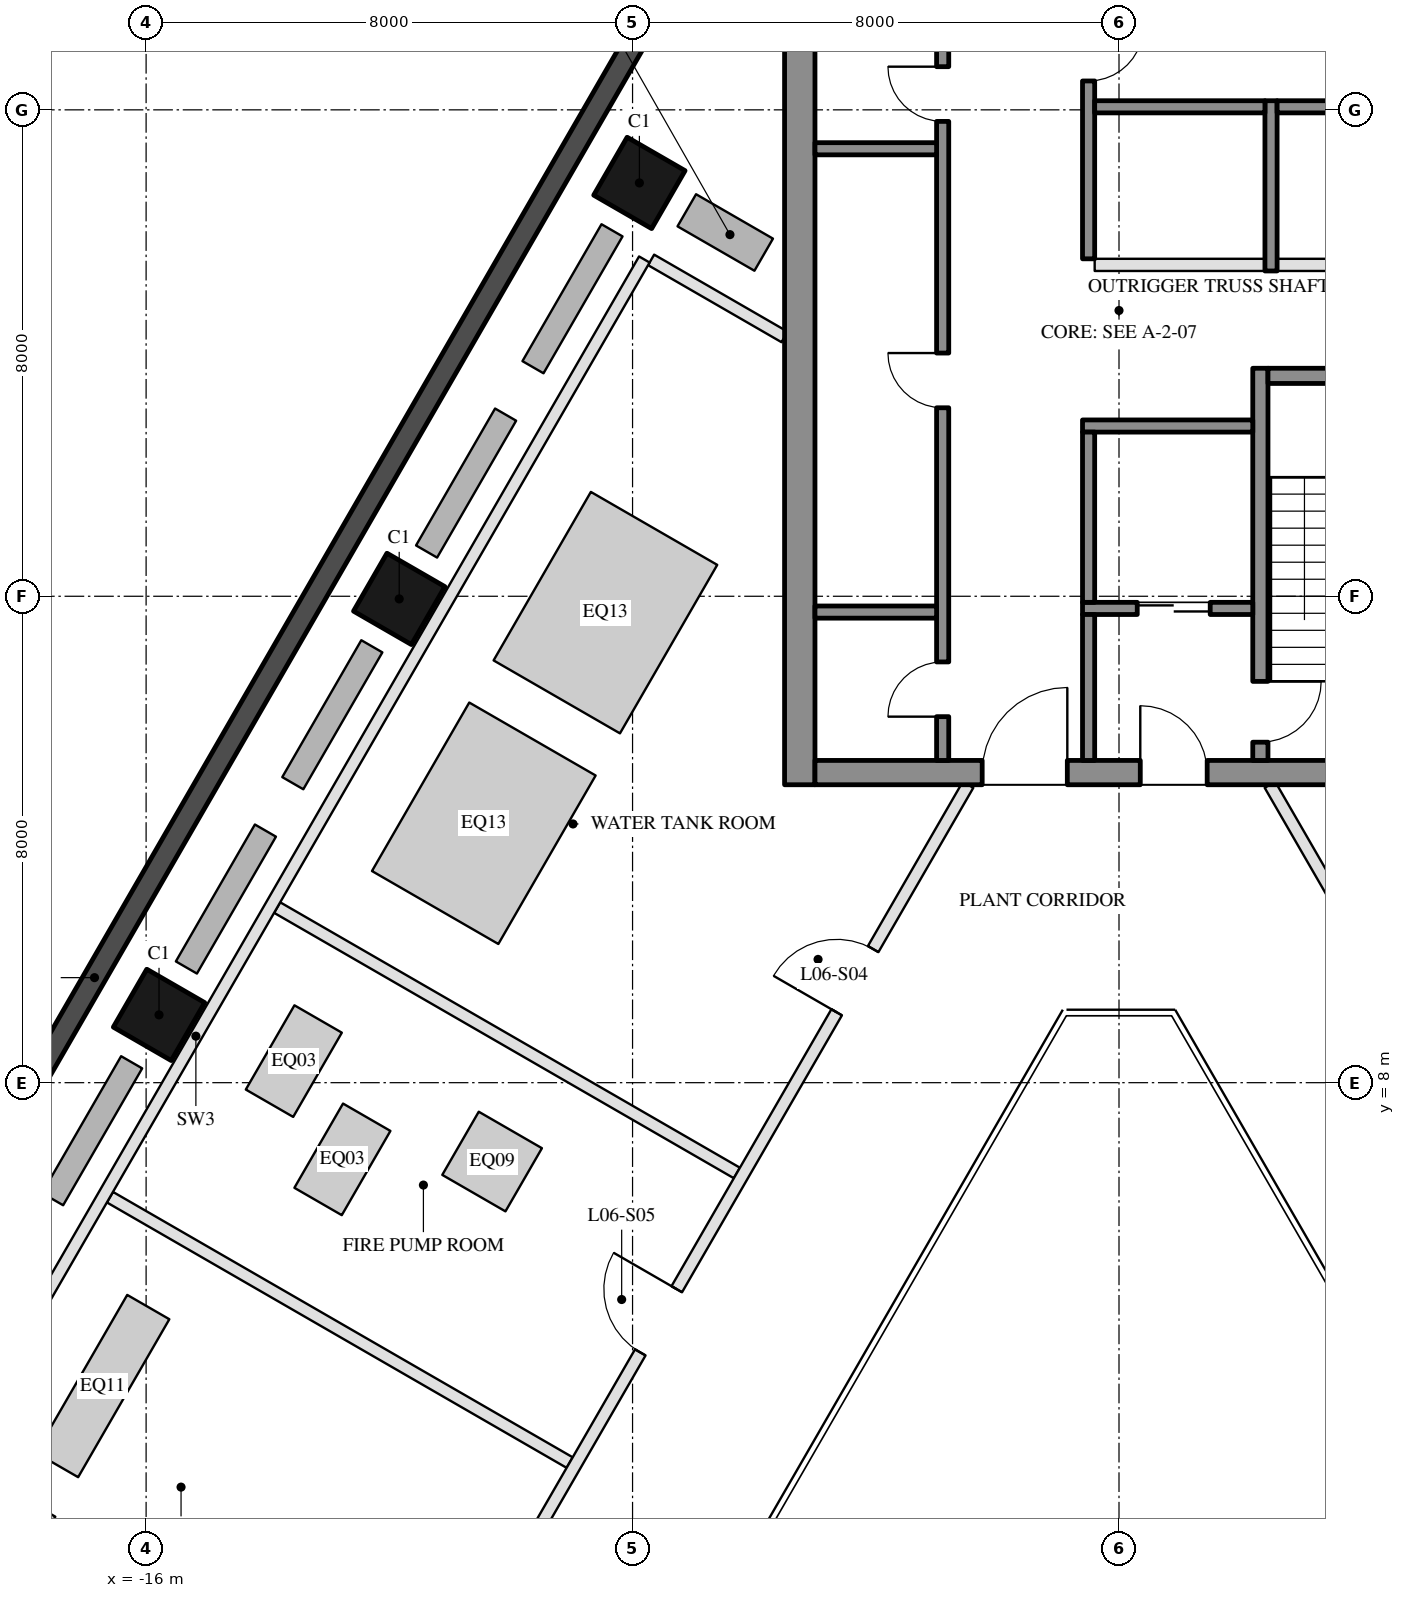
"""IFC4 building model, lengths in metres.
Left out: names, types, materials, properties, quantities, classifications, styles, units other than length and angle.
Written with IfcOpenShell. Run it as: python <this file> out.ifc"""

import sys

from ifc_helpers import new_model, si_unit, direction, frame, frame_2d, origin, origin_2d, place, context, subcontext, project, spatial, rectangle, hollow_rectangle, extrude, boolean, halfspace, element, fill, save


model = new_model("IFC4")
c1 = context("Model", 3, precision=1e-05, world=origin(), true_north=direction((0.0, 1.0)))
c2 = subcontext(c1, "Body", "Model", "MODEL_VIEW")
j1 = project(units=[si_unit("LENGTHUNIT", "METRE"), si_unit("PLANEANGLEUNIT", "RADIAN")], contexts=[c1])
p1 = place(None, origin())
s1 = spatial("IfcSite", under=j1, at=p1, CompositionType="ELEMENT")
p2 = place(p1, origin())
s2 = spatial("IfcBuilding", under=s1, at=p2, CompositionType="ELEMENT")
p3 = place(p2, frame((0.0, 0.0, 37.5)))
s3 = spatial("IfcBuildingStorey", under=s2, at=p3, CompositionType="ELEMENT", Elevation=37.5)
p4 = place(p3, frame((-7.888, 22.798, 0.0), z_axis=(0.0, 0.0, 1.0), x_axis=(0.5, 0.866025403784, 0.0)))
e1 = element("IfcColumn", 1, at=p4, inside=s3, PredefinedType="COLUMN", context=c2, shape_type="SweptSolid", body=[
    boolean("DIFFERENCE", extrude(hollow_rectangle(XDim=1.1, YDim=1.1, WallThickness=0.05, at=origin_2d()), origin(), (0.0, 0.0, 1.0), 4.5), halfspace(frame((0.0, 0.0, 0.007), z_axis=(0.0, 0.0, 1.0), x_axis=(1.0, 0.0, 0.0)), True)),
])
p5 = place(p3, frame((-11.838, 15.957, 0.0), z_axis=(0.0, 0.0, 1.0), x_axis=(0.5, 0.866025403784, 0.0)))
e2 = element("IfcColumn", 2, at=p5, inside=s3, PredefinedType="COLUMN", context=c2, shape_type="SweptSolid", body=[
    boolean("DIFFERENCE", extrude(hollow_rectangle(XDim=1.1, YDim=1.1, WallThickness=0.05, at=origin_2d()), origin(), (0.0, 0.0, 1.0), 4.5), halfspace(frame((0.0, 0.0, 0.006), z_axis=(0.0, 0.0, 1.0), x_axis=(1.0, 0.0, 0.0)), True)),
])
p6 = place(p3, frame((-15.788, 9.115, 0.0), z_axis=(0.0, 0.0, 1.0), x_axis=(0.5, 0.866025403784, 0.0)))
e3 = element("IfcColumn", 3, at=p6, inside=s3, PredefinedType="COLUMN", context=c2, shape_type="SweptSolid", body=[
    boolean("DIFFERENCE", extrude(hollow_rectangle(XDim=1.1, YDim=1.1, WallThickness=0.05, at=origin_2d()), origin(), (0.0, 0.0, 1.0), 4.5), halfspace(frame((0.0, 0.0, 0.006), z_axis=(0.0, 0.0, 1.0), x_axis=(1.0, 0.0, 0.0)), True)),
])
p7 = place(p3, frame((-7.441, 26.022, 0.0), z_axis=(0.0, 0.0, 1.0), x_axis=(-0.499998380999, -0.866026338513, 0.0)))
e4 = element("IfcWall", 4, at=p7, inside=s3, PredefinedType="SOLIDWALL", context=c2, shape_type="SweptSolid", body=[
    extrude(rectangle(XDim=37.631, YDim=0.35, at=frame_2d((18.816, 0.0))), origin(), (0.0, 0.0, 1.0), 4.2),
])
p8 = place(p3, frame((-5.25, 12.9, 0.0), z_axis=(0.0, 0.0, 1.0), x_axis=(0.0, 1.0, 0.0)))
e5 = element("IfcWall", 5, at=p8, inside=s3, PredefinedType="SHEAR", context=c2, shape_type="SweptSolid", body=[
    extrude(rectangle(XDim=14.837, YDim=0.5, at=frame_2d((7.418, 0.0))), origin(), (0.0, 0.0, 1.0), 4.2),
])
p9 = place(p3, frame((5.0, 13.1, 0.0), z_axis=(0.0, 0.0, 1.0), x_axis=(-1.0, 0.0, 0.0)))
e6 = element("IfcWall", 6, at=p9, inside=s3, PredefinedType="SHEAR", context=c2, shape_type="SweptSolid", body=[
    extrude(rectangle(XDim=10.0, YDim=0.4, at=frame_2d((5.0, 0.0))), origin(), (0.0, 0.0, 1.0), 4.2),
])
p10 = place(p9, frame((3.55, 0.0, 0.0)))
e7 = element("IfcOpeningElement", 7, at=p10, cuts=e6, PredefinedType="OPENING", context=c2, shape_type="SweptSolid", body=[
    extrude(rectangle(XDim=1.1, YDim=2.1, at=frame_2d((0.55, 1.05))), frame((0.0, 0.21, 0.0), z_axis=(0.0, -1.0, 0.0), x_axis=(1.0, 0.0, 0.0)), (0.0, 0.0, 1.0), 0.42),
])
p11 = place(p9, frame((5.85, 0.0, 0.0)))
e8 = element("IfcOpeningElement", 8, at=p11, cuts=e6, PredefinedType="OPENING", context=c2, shape_type="SweptSolid", body=[
    extrude(rectangle(XDim=1.4, YDim=2.1, at=frame_2d((0.7, 1.05))), frame((0.0, 0.21, 0.0), z_axis=(0.0, -1.0, 0.0), x_axis=(1.0, 0.0, 0.0)), (0.0, 0.0, 1.0), 0.42),
])
p12 = place(p3, frame((2.325, 13.3, 0.0), z_axis=(0.0, 0.0, 1.0), x_axis=(0.0, 1.0, 0.0)))
e9 = element("IfcWall", 9, at=p12, inside=s3, PredefinedType="SHEAR", context=c2, shape_type="SweptSolid", body=[
    extrude(rectangle(XDim=6.45, YDim=0.25, at=frame_2d((3.225, 0.0))), origin(), (0.0, 0.0, 1.0), 4.2),
])
p13 = place(p12, frame((0.3, 0.0, 0.0)))
e10 = element("IfcOpeningElement", 10, at=p13, cuts=e9, PredefinedType="OPENING", context=c2, shape_type="SweptSolid", body=[
    extrude(rectangle(XDim=1.0, YDim=2.1, at=frame_2d((0.5, 1.05))), frame((0.0, 0.135, 0.0), z_axis=(0.0, -1.0, 0.0), x_axis=(1.0, 0.0, 0.0)), (0.0, 0.0, 1.0), 0.27),
])
p14 = place(p3, frame((5.0, 19.625, 0.0), z_axis=(0.0, 0.0, 1.0), x_axis=(-1.0, 0.0, 0.0)))
e11 = element("IfcWall", 11, at=p14, inside=s3, PredefinedType="SHEAR", context=c2, shape_type="SweptSolid", body=[
    extrude(rectangle(XDim=2.55, YDim=0.25, at=frame_2d((1.275, 0.0))), origin(), (0.0, 0.0, 1.0), 4.2),
])
p15 = place(p3, frame((2.2, 18.8, 0.0), z_axis=(0.0, 0.0, 1.0), x_axis=(-1.0, 0.0, 0.0)))
e12 = element("IfcWall", 12, at=p15, inside=s3, PredefinedType="SHEAR", context=c2, shape_type="SweptSolid", body=[
    extrude(rectangle(XDim=2.8, YDim=0.2, at=frame_2d((1.4, 0.0))), origin(), (0.0, 0.0, 1.0), 4.2),
])
p16 = place(p3, frame((2.2, 15.8, 0.0), z_axis=(0.0, 0.0, 1.0), x_axis=(-1.0, 0.0, 0.0)))
e13 = element("IfcWall", 13, at=p16, inside=s3, PredefinedType="SHEAR", context=c2, shape_type="SweptSolid", body=[
    extrude(rectangle(XDim=2.8, YDim=0.2, at=frame_2d((1.4, 0.0))), origin(), (0.0, 0.0, 1.0), 4.2),
])
p17 = place(p16, frame((0.7, 0.0, 0.0)))
e14 = element("IfcOpeningElement", 14, at=p17, cuts=e13, PredefinedType="OPENING", context=c2, shape_type="SweptSolid", body=[
    extrude(rectangle(XDim=1.2, YDim=2.1, at=frame_2d((0.6, 1.05))), frame((0.0, 0.11, 0.0), z_axis=(0.0, -1.0, 0.0), x_axis=(1.0, 0.0, 0.0)), (0.0, 0.0, 1.0), 0.22),
])
p18 = place(p3, frame((-0.5, 15.9, 0.0), z_axis=(0.0, 0.0, 1.0), x_axis=(0.0, 1.0, 0.0)))
e15 = element("IfcWall", 15, at=p18, inside=s3, PredefinedType="SHEAR", context=c2, shape_type="SweptSolid", body=[
    extrude(rectangle(XDim=2.8, YDim=0.2, at=frame_2d((1.4, 0.0))), origin(), (0.0, 0.0, 1.0), 4.2),
])
p19 = place(p3, frame((-0.5, 13.3, 0.0), z_axis=(0.0, 0.0, 1.0), x_axis=(0.0, 1.0, 0.0)))
e16 = element("IfcWall", 16, at=p19, inside=s3, PredefinedType="SHEAR", context=c2, shape_type="SweptSolid", body=[
    extrude(rectangle(XDim=2.4, YDim=0.2, at=frame_2d((1.2, 0.0))), origin(), (0.0, 0.0, 1.0), 4.2),
])
p20 = place(p3, frame((-2.9, 13.3, 0.0), z_axis=(0.0, 0.0, 1.0), x_axis=(0.0, 1.0, 0.0)))
e17 = element("IfcWall", 17, at=p20, inside=s3, PredefinedType="SHEAR", context=c2, shape_type="SweptSolid", body=[
    extrude(rectangle(XDim=12.6, YDim=0.2, at=frame_2d((6.3, 0.0))), origin(), (0.0, 0.0, 1.0), 4.2),
])
p21 = place(p20, frame((0.72, 0.0, 0.0)))
e18 = element("IfcOpeningElement", 18, at=p21, cuts=e17, PredefinedType="OPENING", context=c2, shape_type="SweptSolid", body=[
    extrude(rectangle(XDim=0.9, YDim=2.1, at=frame_2d((0.45, 1.05))), frame((0.0, 0.11, 0.0), z_axis=(0.0, -1.0, 0.0), x_axis=(1.0, 0.0, 0.0)), (0.0, 0.0, 1.0), 0.22),
])
p22 = place(p20, frame((5.8, 0.0, 0.0)))
e19 = element("IfcOpeningElement", 19, at=p22, cuts=e17, PredefinedType="OPENING", context=c2, shape_type="SweptSolid", body=[
    extrude(rectangle(XDim=0.9, YDim=2.1, at=frame_2d((0.45, 1.05))), frame((0.0, 0.11, 0.0), z_axis=(0.0, -1.0, 0.0), x_axis=(1.0, 0.0, 0.0)), (0.0, 0.0, 1.0), 0.22),
])
p23 = place(p20, frame((10.51, 0.0, 0.0)))
e20 = element("IfcOpeningElement", 20, at=p23, cuts=e17, PredefinedType="OPENING", context=c2, shape_type="SweptSolid", body=[
    extrude(rectangle(XDim=0.9, YDim=2.1, at=frame_2d((0.45, 1.05))), frame((0.0, 0.11, 0.0), z_axis=(0.0, -1.0, 0.0), x_axis=(1.0, 0.0, 0.0)), (0.0, 0.0, 1.0), 0.22),
])
p24 = place(p3, frame((-0.5, 21.55, 0.0), z_axis=(0.0, 0.0, 1.0), x_axis=(0.0, 1.0, 0.0)))
e21 = element("IfcWall", 21, at=p24, inside=s3, PredefinedType="SHEAR", context=c2, shape_type="SweptSolid", body=[
    extrude(rectangle(XDim=4.15, YDim=0.2, at=frame_2d((2.075, 0.0))), origin(), (0.0, 0.0, 1.0), 4.2),
])
p25 = place(p24, frame((2.925, 0.0, 0.0)))
e22 = element("IfcOpeningElement", 22, at=p25, cuts=e21, PredefinedType="OPENING", context=c2, shape_type="SweptSolid", body=[
    extrude(rectangle(XDim=0.9, YDim=2.1, at=frame_2d((0.45, 1.05))), frame((0.0, 0.11, 0.0), z_axis=(0.0, -1.0, 0.0), x_axis=(1.0, 0.0, 0.0)), (0.0, 0.0, 1.0), 0.22),
])
for number, where, z_axis, x_axis in (
    (23, (-3.0, 15.74, 0.0), (0.0, 0.0, 1.0), (-1.0, 0.0, 0.0)),
    (24, (-3.0, 23.36, 0.0), (0.0, 0.0, 1.0), (-1.0, 0.0, 0.0)),
):
    element("IfcWall", number, at=place(p3, frame(where, z_axis=z_axis, x_axis=x_axis)), inside=s3, PredefinedType="SHEAR", context=c2, shape_type="SweptSolid", body=[
        extrude(rectangle(XDim=2.0, YDim=0.2, at=frame_2d((1.0, 0.0))), origin(), (0.0, 0.0, 1.0), 4.2),
    ])
p26 = place(p3, frame((2.5, 21.35, 0.0), z_axis=(0.0, 0.0, 1.0), x_axis=(0.0, 1.0, 0.0)))
e25 = element("IfcWall", 25, at=p26, inside=s3, PredefinedType="SHEAR", context=c2, shape_type="SweptSolid", body=[
    extrude(rectangle(XDim=2.8, YDim=0.2, at=frame_2d((1.4, 0.0))), origin(), (0.0, 0.0, 1.0), 4.2),
])
p27 = place(p3, frame((5.0, 24.05, 0.0), z_axis=(0.0, 0.0, 1.0), x_axis=(-1.0, 0.0, 0.0)))
e26 = element("IfcWall", 26, at=p27, inside=s3, PredefinedType="SHEAR", context=c2, shape_type="SweptSolid", body=[
    extrude(rectangle(XDim=2.4, YDim=0.2, at=frame_2d((1.2, 0.0))), origin(), (0.0, 0.0, 1.0), 4.2),
])
p28 = place(p3, frame((2.4, 24.05, 0.0), z_axis=(0.0, 0.0, 1.0), x_axis=(-1.0, 0.0, 0.0)))
e27 = element("IfcWall", 27, at=p28, inside=s3, PredefinedType="SHEAR", context=c2, shape_type="SweptSolid", body=[
    extrude(rectangle(XDim=2.8, YDim=0.2, at=frame_2d((1.4, 0.0))), origin(), (0.0, 0.0, 1.0), 4.2),
])
p29 = place(p3, frame((5.0, 21.45, 0.0), z_axis=(0.0, 0.0, 1.0), x_axis=(-1.0, 0.0, 0.0)))
e28 = element("IfcWall", 28, at=p29, inside=s3, PredefinedType="PARTITIONING", context=c2, shape_type="SweptSolid", body=[
    extrude(rectangle(XDim=2.4, YDim=0.2, at=frame_2d((1.2, 0.0))), origin(), (0.0, 0.0, 1.0), 4.2),
])
p30 = place(p3, frame((2.4, 21.45, 0.0), z_axis=(0.0, 0.0, 1.0), x_axis=(-1.0, 0.0, 0.0)))
e29 = element("IfcWall", 29, at=p30, inside=s3, PredefinedType="PARTITIONING", context=c2, shape_type="SweptSolid", body=[
    extrude(rectangle(XDim=2.8, YDim=0.2, at=frame_2d((1.4, 0.0))), origin(), (0.0, 0.0, 1.0), 4.2),
])
p31 = place(p3, frame((12.413, -4.3, 0.0), z_axis=(0.0, 0.0, 1.0), x_axis=(-0.50000478328, 0.866022642139, 0.0)))
e30 = element("IfcWall", 30, at=p31, inside=s3, PredefinedType="PARTITIONING", context=c2, shape_type="SweptSolid", body=[
    extrude(rectangle(XDim=19.861, YDim=0.2, at=frame_2d((9.931, 0.0))), origin(), (0.0, 0.0, 1.0), 3.41),
])
p32 = place(p31, frame((2.371, 0.0, 0.0)))
e31 = element("IfcOpeningElement", 31, at=p32, cuts=e30, PredefinedType="OPENING", context=c2, shape_type="SweptSolid", body=[
    extrude(rectangle(XDim=1.2, YDim=2.1, at=frame_2d((0.6, 1.05))), frame((0.0, 0.11, 0.0), z_axis=(0.0, -1.0, 0.0), x_axis=(1.0, 0.0, 0.0)), (0.0, 0.0, 1.0), 0.22),
])
p33 = place(p31, frame((8.331, 0.0, 0.0)))
e32 = element("IfcOpeningElement", 32, at=p33, cuts=e30, PredefinedType="OPENING", context=c2, shape_type="SweptSolid", body=[
    extrude(rectangle(XDim=1.2, YDim=2.1, at=frame_2d((0.6, 1.05))), frame((0.0, 0.11, 0.0), z_axis=(0.0, -1.0, 0.0), x_axis=(1.0, 0.0, 0.0)), (0.0, 0.0, 1.0), 0.22),
])
p34 = place(p31, frame((15.29, 0.0, 0.0)))
e33 = element("IfcOpeningElement", 33, at=p34, cuts=e30, PredefinedType="OPENING", context=c2, shape_type="SweptSolid", body=[
    extrude(rectangle(XDim=1.2, YDim=2.1, at=frame_2d((0.6, 1.05))), frame((0.0, 0.11, 0.0), z_axis=(0.0, -1.0, 0.0), x_axis=(1.0, 0.0, 0.0)), (0.0, 0.0, 1.0), 0.22),
])
p35 = place(p3, frame((-7.695, 21.532, 0.0), z_axis=(0.0, 0.0, 1.0), x_axis=(0.865999496279, -0.500044870432, 0.0)))
e34 = element("IfcWall", 34, at=p35, inside=s3, PredefinedType="PARTITIONING", context=c2, shape_type="SweptSolid", body=[
    extrude(rectangle(XDim=2.534, YDim=0.2, at=frame_2d((1.267, 0.0))), origin(), (0.0, 0.0, 1.0), 4.2),
])
for number, where, z_axis, x_axis in (
    (35, (-13.845, 10.88, 0.0), (0.0, 0.0, 1.0), (0.866, -0.5, 0.0)),
    (36, (-16.595, 6.117, 0.0), (0.0, 0.0, 1.0), (0.866, -0.5, 0.0)),
):
    element("IfcWall", number, at=place(p3, frame(where, z_axis=z_axis, x_axis=x_axis)), inside=s3, PredefinedType="PARTITIONING", context=c2, shape_type="SweptSolid", body=[
        extrude(rectangle(XDim=8.73, YDim=0.2, at=frame_2d((4.365, 0.0))), origin(), (0.0, 0.0, 1.0), 4.2),
    ])
p36 = place(p3, frame((-7.806, 21.539, 0.0), z_axis=(0.0, 0.0, 1.0), x_axis=(-0.500002084189, -0.866024200474, 0.0)))
e37 = element("IfcWall", 37, at=p36, inside=s3, PredefinedType="PARTITIONING", context=c2, shape_type="SweptSolid", body=[
    extrude(rectangle(XDim=29.5, YDim=0.2, at=frame_2d((14.75, 0.0))), origin(), (0.0, 0.0, 1.0), 3.41),
])
p37 = place(p3, frame((-2.482, 12.9, 0.0), z_axis=(0.0, 0.0, 1.0), x_axis=(-0.50000478328, -0.866022642139, 0.0)))
e38 = element("IfcWall", 38, at=p37, inside=s3, PredefinedType="PARTITIONING", context=c2, shape_type="SweptSolid", body=[
    extrude(rectangle(XDim=19.861, YDim=0.2, at=frame_2d((9.931, 0.0))), origin(), (0.0, 0.0, 1.0), 3.41),
])
p38 = place(p37, frame((3.121, 0.0, 0.0)))
e39 = element("IfcOpeningElement", 39, at=p38, cuts=e38, PredefinedType="OPENING", context=c2, shape_type="SweptSolid", body=[
    extrude(rectangle(XDim=1.2, YDim=2.1, at=frame_2d((0.6, 1.05))), frame((0.0, 0.11, 0.0), z_axis=(0.0, -1.0, 0.0), x_axis=(1.0, 0.0, 0.0)), (0.0, 0.0, 1.0), 0.22),
])
p39 = place(p37, frame((9.581, 0.0, 0.0)))
e40 = element("IfcOpeningElement", 40, at=p39, cuts=e38, PredefinedType="OPENING", context=c2, shape_type="SweptSolid", body=[
    extrude(rectangle(XDim=1.2, YDim=2.1, at=frame_2d((0.6, 1.05))), frame((0.0, 0.11, 0.0), z_axis=(0.0, -1.0, 0.0), x_axis=(1.0, 0.0, 0.0)), (0.0, 0.0, 1.0), 0.22),
])
p40 = place(p37, frame((15.79, 0.0, 0.0)))
e41 = element("IfcOpeningElement", 41, at=p40, cuts=e38, PredefinedType="OPENING", context=c2, shape_type="SweptSolid", body=[
    extrude(rectangle(XDim=1.2, YDim=2.1, at=frame_2d((0.6, 1.05))), frame((0.0, 0.11, 0.0), z_axis=(0.0, -1.0, 0.0), x_axis=(1.0, 0.0, 0.0)), (0.0, 0.0, 1.0), 0.22),
])
p41 = place(p17, origin())
e42 = element("IfcDoor", 42, at=p41, inside=s3, OperationType="DOUBLE_DOOR_SLIDING", PredefinedType="DOOR", context=c2, shape_type="SweptSolid", body=[
    extrude(rectangle(XDim=1.2, YDim=2.1, at=frame_2d((0.6, 1.05))), frame((0.0, 0.025, 0.0), z_axis=(0.0, -1.0, 0.0), x_axis=(1.0, 0.0, 0.0)), (0.0, 0.0, 1.0), 0.05),
])
fill(e14, e42)
p42 = place(p21, origin())
e43 = element("IfcDoor", 43, at=p42, inside=s3, OperationType="SINGLE_SWING_LEFT", PredefinedType="DOOR", context=c2, shape_type="SweptSolid", body=[
    extrude(rectangle(XDim=0.9, YDim=2.1, at=frame_2d((0.45, 1.05))), frame((0.0, 0.025, 0.0), z_axis=(0.0, -1.0, 0.0), x_axis=(1.0, 0.0, 0.0)), (0.0, 0.0, 1.0), 0.05),
])
fill(e18, e43)
p43 = place(p22, origin())
e44 = element("IfcDoor", 44, at=p43, inside=s3, OperationType="SINGLE_SWING_RIGHT", PredefinedType="DOOR", context=c2, shape_type="SweptSolid", body=[
    extrude(rectangle(XDim=0.9, YDim=2.1, at=frame_2d((0.45, 1.05))), frame((0.0, 0.025, 0.0), z_axis=(0.0, -1.0, 0.0), x_axis=(1.0, 0.0, 0.0)), (0.0, 0.0, 1.0), 0.05),
])
fill(e19, e44)
p44 = place(p23, origin())
e45 = element("IfcDoor", 45, at=p44, inside=s3, OperationType="SINGLE_SWING_RIGHT", PredefinedType="DOOR", context=c2, shape_type="SweptSolid", body=[
    extrude(rectangle(XDim=0.9, YDim=2.1, at=frame_2d((0.45, 1.05))), frame((0.0, 0.025, 0.0), z_axis=(0.0, -1.0, 0.0), x_axis=(1.0, 0.0, 0.0)), (0.0, 0.0, 1.0), 0.05),
])
fill(e20, e45)
p45 = place(p25, frame((0.9, 0.0, 0.0), z_axis=(0.0, 0.0, 1.0), x_axis=(-1.0, 0.0, 0.0)))
e46 = element("IfcDoor", 46, at=p45, inside=s3, OperationType="SINGLE_SWING_LEFT", PredefinedType="DOOR", context=c2, shape_type="SweptSolid", body=[
    extrude(rectangle(XDim=0.9, YDim=2.1, at=frame_2d((0.45, 1.05))), frame((0.0, 0.025, 0.0), z_axis=(0.0, -1.0, 0.0), x_axis=(1.0, 0.0, 0.0)), (0.0, 0.0, 1.0), 0.05),
])
fill(e22, e46)
p46 = place(p10, frame((1.1, 0.0, 0.0), z_axis=(0.0, 0.0, 1.0), x_axis=(-1.0, 0.0, 0.0)))
e47 = element("IfcDoor", 47, at=p46, inside=s3, OperationType="SINGLE_SWING_LEFT", PredefinedType="DOOR", context=c2, shape_type="SweptSolid", body=[
    extrude(rectangle(XDim=1.1, YDim=2.1, at=frame_2d((0.55, 1.05))), frame((0.0, 0.025, 0.0), z_axis=(0.0, -1.0, 0.0), x_axis=(1.0, 0.0, 0.0)), (0.0, 0.0, 1.0), 0.05),
])
fill(e7, e47)
p47 = place(p11, frame((1.4, 0.0, 0.0), z_axis=(0.0, 0.0, 1.0), x_axis=(-1.0, 0.0, 0.0)))
e48 = element("IfcDoor", 48, at=p47, inside=s3, OperationType="DOUBLE_DOOR_SINGLE_SWING", PredefinedType="DOOR", context=c2, shape_type="SweptSolid", body=[
    extrude(rectangle(XDim=1.4, YDim=2.1, at=frame_2d((0.7, 1.05))), frame((0.0, 0.025, 0.0), z_axis=(0.0, -1.0, 0.0), x_axis=(1.0, 0.0, 0.0)), (0.0, 0.0, 1.0), 0.05),
])
fill(e8, e48)
p48 = place(p13, frame((1.0, 0.0, 0.0), z_axis=(0.0, 0.0, 1.0), x_axis=(-1.0, 0.0, 0.0)))
e49 = element("IfcDoor", 49, at=p48, inside=s3, OperationType="SINGLE_SWING_LEFT", PredefinedType="DOOR", context=c2, shape_type="SweptSolid", body=[
    extrude(rectangle(XDim=1.0, YDim=2.1, at=frame_2d((0.5, 1.05))), frame((0.0, 0.025, 0.0), z_axis=(0.0, -1.0, 0.0), x_axis=(1.0, 0.0, 0.0)), (0.0, 0.0, 1.0), 0.05),
])
fill(e10, e49)
p49 = place(p38, frame((1.2, 0.0, 0.0), z_axis=(0.0, 0.0, 1.0), x_axis=(-1.0, 0.0, 0.0)))
e50 = element("IfcDoor", 50, at=p49, inside=s3, OperationType="SINGLE_SWING_LEFT", PredefinedType="DOOR", context=c2, shape_type="SweptSolid", body=[
    extrude(rectangle(XDim=1.2, YDim=2.1, at=frame_2d((0.6, 1.05))), frame((0.0, 0.025, 0.0), z_axis=(0.0, -1.0, 0.0), x_axis=(1.0, 0.0, 0.0)), (0.0, 0.0, 1.0), 0.05),
])
fill(e39, e50)
p50 = place(p39, frame((1.2, 0.0, 0.0), z_axis=(0.0, 0.0, 1.0), x_axis=(-1.0, 0.0, 0.0)))
e51 = element("IfcDoor", 51, at=p50, inside=s3, OperationType="SINGLE_SWING_RIGHT", PredefinedType="DOOR", context=c2, shape_type="SweptSolid", body=[
    extrude(rectangle(XDim=1.2, YDim=2.1, at=frame_2d((0.6, 1.05))), frame((0.0, 0.025, 0.0), z_axis=(0.0, -1.0, 0.0), x_axis=(1.0, 0.0, 0.0)), (0.0, 0.0, 1.0), 0.05),
])
fill(e40, e51)
save(model, sys.argv[1])
